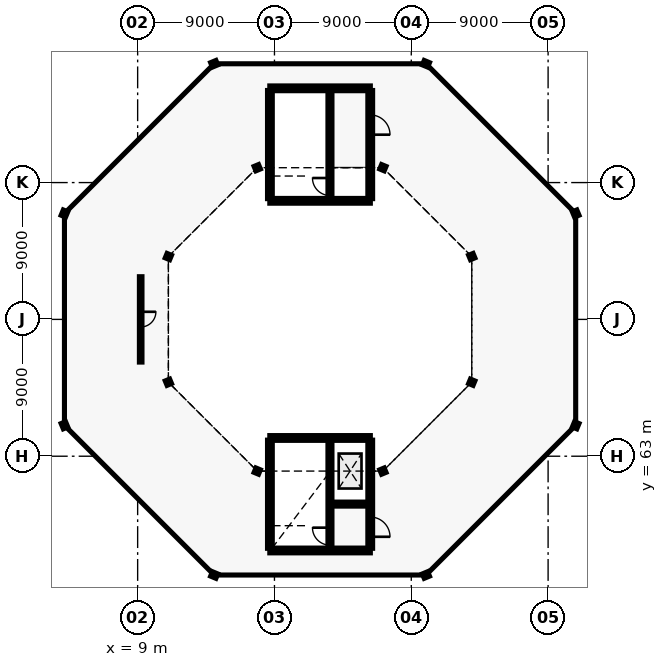
"""IFC4 building model, lengths in metres.
Left out: names, types, materials, properties, quantities, classifications, styles, units other than length and angle.
Written with IfcOpenShell. Run it as: python <this file> out.ifc"""

import sys

from ifc_helpers import new_model, si_unit, direction, frame, frame_2d, origin, origin_2d, place, context, subcontext, project, spatial, rectangle, i_section, extrude, element, fill, save


model = new_model("IFC4")
c1 = context("Model", 3, precision=1e-05, world=origin(), true_north=direction((0.0, 1.0)))
c2 = subcontext(c1, "Body", "Model", "MODEL_VIEW")
j1 = project(units=[si_unit("LENGTHUNIT", "METRE"), si_unit("PLANEANGLEUNIT", "RADIAN")], contexts=[c1])
p1 = place(None, origin())
s1 = spatial("IfcSite", under=j1, at=p1, CompositionType="ELEMENT")
p2 = place(p1, origin())
s2 = spatial("IfcBuilding", under=s1, at=p2, CompositionType="ELEMENT")
p3 = place(p2, frame((0.0, 0.0, 5.4)))
s3 = spatial("IfcBuildingStorey", under=s2, at=p3, CompositionType="ELEMENT", Elevation=5.4)
p4 = place(p3, frame((30.978, 76.133, 0.0), z_axis=(0.0, 0.0, 1.0), x_axis=(0.923879532511, 0.382683432365, 0.0)))
e1 = element("IfcColumn", 1, at=p4, inside=s3, PredefinedType="COLUMN", context=c2, shape_type="SweptSolid", body=[
    extrude(i_section(OverallWidth=0.3, OverallDepth=0.3, WebThickness=0.011, FlangeThickness=0.019, FilletRadius=0.027, at=origin_2d()), origin(), (0.0, 0.0, 1.0), 5.18),
])
p5 = place(p3, frame((37.815, 78.965, 0.0), z_axis=(0.0, 0.0, 1.0), x_axis=(0.923879532511, 0.382683432365, 0.0)))
e2 = element("IfcColumn", 2, at=p5, inside=s3, PredefinedType="COLUMN", context=c2, shape_type="SweptSolid", body=[
    extrude(i_section(OverallWidth=0.3, OverallDepth=0.36, WebThickness=0.012, FlangeThickness=0.022, FilletRadius=0.027, at=origin_2d()), origin(), (0.0, 0.0, 1.0), 5.18),
])
p6 = place(p3, frame((25.133, 81.978, 0.0), z_axis=(0.0, 0.0, 1.0), x_axis=(0.382683432365, 0.923879532511, 0.0)))
e3 = element("IfcColumn", 3, at=p6, inside=s3, PredefinedType="COLUMN", context=c2, shape_type="SweptSolid", body=[
    extrude(i_section(OverallWidth=0.3, OverallDepth=0.3, WebThickness=0.011, FlangeThickness=0.019, FilletRadius=0.027, at=origin_2d()), origin(), (0.0, 0.0, 1.0), 5.18),
])
p7 = place(p3, frame((27.965, 88.815, 0.0), z_axis=(0.0, 0.0, 1.0), x_axis=(0.382683432365, 0.923879532511, 0.0)))
e4 = element("IfcColumn", 4, at=p7, inside=s3, PredefinedType="COLUMN", context=c2, shape_type="SweptSolid", body=[
    extrude(i_section(OverallWidth=0.3, OverallDepth=0.36, WebThickness=0.012, FlangeThickness=0.022, FilletRadius=0.027, at=origin_2d()), origin(), (0.0, 0.0, 1.0), 5.18),
])
p8 = place(p3, frame((16.867, 81.978, 0.0), z_axis=(0.0, 0.0, 1.0), x_axis=(-0.382683432365, 0.923879532511, 0.0)))
e5 = element("IfcColumn", 5, at=p8, inside=s3, PredefinedType="COLUMN", context=c2, shape_type="SweptSolid", body=[
    extrude(i_section(OverallWidth=0.3, OverallDepth=0.3, WebThickness=0.011, FlangeThickness=0.019, FilletRadius=0.027, at=origin_2d()), origin(), (0.0, 0.0, 1.0), 5.18),
])
p9 = place(p3, frame((14.035, 88.815, 0.0), z_axis=(0.0, 0.0, 1.0), x_axis=(-0.382683432365, 0.923879532511, 0.0)))
e6 = element("IfcColumn", 6, at=p9, inside=s3, PredefinedType="COLUMN", context=c2, shape_type="SweptSolid", body=[
    extrude(i_section(OverallWidth=0.3, OverallDepth=0.36, WebThickness=0.012, FlangeThickness=0.022, FilletRadius=0.027, at=origin_2d()), origin(), (0.0, 0.0, 1.0), 5.18),
])
p10 = place(p3, frame((11.022, 76.133, 0.0), z_axis=(0.0, 0.0, 1.0), x_axis=(-0.923879532511, 0.382683432365, 0.0)))
e7 = element("IfcColumn", 7, at=p10, inside=s3, PredefinedType="COLUMN", context=c2, shape_type="SweptSolid", body=[
    extrude(i_section(OverallWidth=0.3, OverallDepth=0.3, WebThickness=0.011, FlangeThickness=0.019, FilletRadius=0.027, at=origin_2d()), origin(), (0.0, 0.0, 1.0), 5.18),
])
p11 = place(p3, frame((4.185, 78.965, 0.0), z_axis=(0.0, 0.0, 1.0), x_axis=(-0.923879532511, 0.382683432365, 0.0)))
e8 = element("IfcColumn", 8, at=p11, inside=s3, PredefinedType="COLUMN", context=c2, shape_type="SweptSolid", body=[
    extrude(i_section(OverallWidth=0.3, OverallDepth=0.36, WebThickness=0.012, FlangeThickness=0.022, FilletRadius=0.027, at=origin_2d()), origin(), (0.0, 0.0, 1.0), 5.18),
])
p12 = place(p3, frame((11.022, 67.867, 0.0), z_axis=(0.0, 0.0, 1.0), x_axis=(-0.923879532511, -0.382683432365, 0.0)))
e9 = element("IfcColumn", 9, at=p12, inside=s3, PredefinedType="COLUMN", context=c2, shape_type="SweptSolid", body=[
    extrude(i_section(OverallWidth=0.3, OverallDepth=0.3, WebThickness=0.011, FlangeThickness=0.019, FilletRadius=0.027, at=origin_2d()), origin(), (0.0, 0.0, 1.0), 5.18),
])
p13 = place(p3, frame((4.185, 65.035, 0.0), z_axis=(0.0, 0.0, 1.0), x_axis=(-0.923879532511, -0.382683432365, 0.0)))
e10 = element("IfcColumn", 10, at=p13, inside=s3, PredefinedType="COLUMN", context=c2, shape_type="SweptSolid", body=[
    extrude(i_section(OverallWidth=0.3, OverallDepth=0.36, WebThickness=0.012, FlangeThickness=0.022, FilletRadius=0.027, at=origin_2d()), origin(), (0.0, 0.0, 1.0), 5.18),
])
p14 = place(p3, frame((16.867, 62.022, 0.0), z_axis=(0.0, 0.0, 1.0), x_axis=(-0.382683432365, -0.923879532511, 0.0)))
e11 = element("IfcColumn", 11, at=p14, inside=s3, PredefinedType="COLUMN", context=c2, shape_type="SweptSolid", body=[
    extrude(i_section(OverallWidth=0.3, OverallDepth=0.3, WebThickness=0.011, FlangeThickness=0.019, FilletRadius=0.027, at=origin_2d()), origin(), (0.0, 0.0, 1.0), 5.18),
])
p15 = place(p3, frame((14.035, 55.185, 0.0), z_axis=(0.0, 0.0, 1.0), x_axis=(-0.382683432365, -0.923879532511, 0.0)))
e12 = element("IfcColumn", 12, at=p15, inside=s3, PredefinedType="COLUMN", context=c2, shape_type="SweptSolid", body=[
    extrude(i_section(OverallWidth=0.3, OverallDepth=0.36, WebThickness=0.012, FlangeThickness=0.022, FilletRadius=0.027, at=origin_2d()), origin(), (0.0, 0.0, 1.0), 5.18),
])
p16 = place(p3, frame((25.133, 62.022, 0.0), z_axis=(0.0, 0.0, 1.0), x_axis=(0.382683432365, -0.923879532511, 0.0)))
e13 = element("IfcColumn", 13, at=p16, inside=s3, PredefinedType="COLUMN", context=c2, shape_type="SweptSolid", body=[
    extrude(i_section(OverallWidth=0.3, OverallDepth=0.3, WebThickness=0.011, FlangeThickness=0.019, FilletRadius=0.027, at=origin_2d()), origin(), (0.0, 0.0, 1.0), 5.18),
])
p17 = place(p3, frame((27.965, 55.185, 0.0), z_axis=(0.0, 0.0, 1.0), x_axis=(0.382683432365, -0.923879532511, 0.0)))
e14 = element("IfcColumn", 14, at=p17, inside=s3, PredefinedType="COLUMN", context=c2, shape_type="SweptSolid", body=[
    extrude(i_section(OverallWidth=0.3, OverallDepth=0.36, WebThickness=0.012, FlangeThickness=0.022, FilletRadius=0.027, at=origin_2d()), origin(), (0.0, 0.0, 1.0), 5.18),
])
p18 = place(p3, frame((30.978, 67.867, 0.0), z_axis=(0.0, 0.0, 1.0), x_axis=(0.923879532511, -0.382683432365, 0.0)))
e15 = element("IfcColumn", 15, at=p18, inside=s3, PredefinedType="COLUMN", context=c2, shape_type="SweptSolid", body=[
    extrude(i_section(OverallWidth=0.3, OverallDepth=0.3, WebThickness=0.011, FlangeThickness=0.019, FilletRadius=0.027, at=origin_2d()), origin(), (0.0, 0.0, 1.0), 5.18),
])
p19 = place(p3, frame((37.815, 65.035, 0.0), z_axis=(0.0, 0.0, 1.0), x_axis=(0.923879532511, -0.382683432365, 0.0)))
e16 = element("IfcColumn", 16, at=p19, inside=s3, PredefinedType="COLUMN", context=c2, shape_type="SweptSolid", body=[
    extrude(i_section(OverallWidth=0.3, OverallDepth=0.36, WebThickness=0.012, FlangeThickness=0.022, FilletRadius=0.027, at=origin_2d()), origin(), (0.0, 0.0, 1.0), 5.18),
])
for number, where, z_axis, x_axis in (
    (17, (17.7, 56.8, 0.0), (0.0, 0.0, 1.0), (1.0, 0.0, 0.0)),
    (18, (17.7, 64.2, 0.0), (0.0, 0.0, 1.0), (1.0, 0.0, 0.0)),
):
    element("IfcWall", number, at=place(p3, frame(where, z_axis=z_axis, x_axis=x_axis)), inside=s3, PredefinedType="SHEAR", context=c2, shape_type="SweptSolid", body=[
        extrude(rectangle(XDim=6.6, YDim=0.3, at=frame_2d((3.3, 0.0))), origin(), (0.0, 0.0, 1.0), 4.0),
    ])
p20 = place(p3, frame((17.7, 56.95, 0.0), z_axis=(0.0, 0.0, 1.0), x_axis=(0.0, 1.0, 0.0)))
e19 = element("IfcWall", 19, at=p20, inside=s3, PredefinedType="SHEAR", context=c2, shape_type="SweptSolid", body=[
    extrude(rectangle(XDim=7.1, YDim=0.3, at=frame_2d((3.55, 0.0))), origin(), (0.0, 0.0, 1.0), 4.0),
])
p21 = place(p3, frame((24.3, 56.95, 0.0), z_axis=(0.0, 0.0, 1.0), x_axis=(0.0, 1.0, 0.0)))
e20 = element("IfcWall", 20, at=p21, inside=s3, PredefinedType="SHEAR", context=c2, shape_type="SweptSolid", body=[
    extrude(rectangle(XDim=7.1, YDim=0.3, at=frame_2d((3.55, 0.0))), origin(), (0.0, 0.0, 1.0), 4.0),
])
p22 = place(p21, frame((0.75, 0.0, 0.0)))
e21 = element("IfcOpeningElement", 21, at=p22, cuts=e20, PredefinedType="OPENING", context=c2, shape_type="SweptSolid", body=[
    extrude(rectangle(XDim=1.3, YDim=2.15, at=frame_2d((0.65, 1.075))), frame((0.0, 0.16, 0.0), z_axis=(0.0, -1.0, 0.0), x_axis=(1.0, 0.0, 0.0)), (0.0, 0.0, 1.0), 0.32),
])
p23 = place(p3, frame((21.65, 56.95, 0.0), z_axis=(0.0, 0.0, 1.0), x_axis=(0.0, 1.0, 0.0)))
e22 = element("IfcWall", 22, at=p23, inside=s3, PredefinedType="SHEAR", context=c2, shape_type="SweptSolid", body=[
    extrude(rectangle(XDim=7.1, YDim=0.25, at=frame_2d((3.55, 0.0))), origin(), (0.0, 0.0, 1.0), 4.0),
])
p24 = place(p23, frame((0.2, 0.0, 0.0)))
e23 = element("IfcOpeningElement", 23, at=p24, cuts=e22, PredefinedType="OPENING", context=c2, shape_type="SweptSolid", body=[
    extrude(rectangle(XDim=1.15, YDim=2.15, at=frame_2d((0.575, 1.075))), frame((0.0, 0.135, 0.0), z_axis=(0.0, -1.0, 0.0), x_axis=(1.0, 0.0, 0.0)), (0.0, 0.0, 1.0), 0.27),
])
p25 = place(p3, frame((21.77, 59.85, 0.0), z_axis=(0.0, 0.0, 1.0), x_axis=(1.0, 0.0, 0.0)))
e24 = element("IfcWall", 24, at=p25, inside=s3, PredefinedType="SHEAR", context=c2, shape_type="SweptSolid", body=[
    extrude(rectangle(XDim=2.38, YDim=0.25, at=frame_2d((1.19, 0.0))), origin(), (0.0, 0.0, 1.0), 4.0),
])
p26 = place(p25, frame((0.64, 0.0, 0.0)))
e25 = element("IfcOpeningElement", 25, at=p26, cuts=e24, PredefinedType="OPENING", context=c2, shape_type="SweptSolid", body=[
    extrude(rectangle(XDim=1.1, YDim=2.15, at=frame_2d((0.55, 1.075))), frame((0.0, 0.135, 0.0), z_axis=(0.0, -1.0, 0.0), x_axis=(1.0, 0.0, 0.0)), (0.0, 0.0, 1.0), 0.27),
])
for number, where, z_axis, x_axis in (
    (26, (17.7, 79.8, 0.0), (0.0, 0.0, 1.0), (1.0, 0.0, 0.0)),
    (27, (17.7, 87.2, 0.0), (0.0, 0.0, 1.0), (1.0, 0.0, 0.0)),
):
    element("IfcWall", number, at=place(p3, frame(where, z_axis=z_axis, x_axis=x_axis)), inside=s3, PredefinedType="SHEAR", context=c2, shape_type="SweptSolid", body=[
        extrude(rectangle(XDim=6.6, YDim=0.3, at=frame_2d((3.3, 0.0))), origin(), (0.0, 0.0, 1.0), 4.0),
    ])
p27 = place(p3, frame((17.7, 79.95, 0.0), z_axis=(0.0, 0.0, 1.0), x_axis=(0.0, 1.0, 0.0)))
e28 = element("IfcWall", 28, at=p27, inside=s3, PredefinedType="SHEAR", context=c2, shape_type="SweptSolid", body=[
    extrude(rectangle(XDim=7.1, YDim=0.3, at=frame_2d((3.55, 0.0))), origin(), (0.0, 0.0, 1.0), 4.0),
])
p28 = place(p3, frame((24.3, 79.95, 0.0), z_axis=(0.0, 0.0, 1.0), x_axis=(0.0, 1.0, 0.0)))
e29 = element("IfcWall", 29, at=p28, inside=s3, PredefinedType="SHEAR", context=c2, shape_type="SweptSolid", body=[
    extrude(rectangle(XDim=7.1, YDim=0.3, at=frame_2d((3.55, 0.0))), origin(), (0.0, 0.0, 1.0), 4.0),
])
p29 = place(p28, frame((4.2, 0.0, 0.0)))
e30 = element("IfcOpeningElement", 30, at=p29, cuts=e29, PredefinedType="OPENING", context=c2, shape_type="SweptSolid", body=[
    extrude(rectangle(XDim=1.3, YDim=2.15, at=frame_2d((0.65, 1.075))), frame((0.0, 0.16, 0.0), z_axis=(0.0, -1.0, 0.0), x_axis=(1.0, 0.0, 0.0)), (0.0, 0.0, 1.0), 0.32),
])
p30 = place(p3, frame((21.65, 79.95, 0.0), z_axis=(0.0, 0.0, 1.0), x_axis=(0.0, 1.0, 0.0)))
e31 = element("IfcWall", 31, at=p30, inside=s3, PredefinedType="SHEAR", context=c2, shape_type="SweptSolid", body=[
    extrude(rectangle(XDim=7.1, YDim=0.25, at=frame_2d((3.55, 0.0))), origin(), (0.0, 0.0, 1.0), 4.0),
])
p31 = place(p30, frame((0.2, 0.0, 0.0)))
e32 = element("IfcOpeningElement", 32, at=p31, cuts=e31, PredefinedType="OPENING", context=c2, shape_type="SweptSolid", body=[
    extrude(rectangle(XDim=1.15, YDim=2.15, at=frame_2d((0.575, 1.075))), frame((0.0, 0.135, 0.0), z_axis=(0.0, -1.0, 0.0), x_axis=(1.0, 0.0, 0.0)), (0.0, 0.0, 1.0), 0.27),
])
p32 = place(p3, frame((9.2, 69.2, 0.0), z_axis=(0.0, 0.0, 1.0), x_axis=(0.0, 1.0, 0.0)))
e33 = element("IfcWall", 33, at=p32, inside=s3, PredefinedType="PARTITIONING", context=c2, shape_type="SweptSolid", body=[
    extrude(rectangle(XDim=5.6, YDim=0.155, at=frame_2d((2.8, 0.0))), origin(), (0.0, 0.0, 1.0), 3.2),
])
p33 = place(p32, frame((2.3, 0.0, 0.0)))
e34 = element("IfcOpeningElement", 34, at=p33, cuts=e33, PredefinedType="OPENING", context=c2, shape_type="SweptSolid", body=[
    extrude(rectangle(XDim=1.0, YDim=2.1, at=frame_2d((0.5, 1.05))), frame((0.0, 0.087, 0.0), z_axis=(0.0, -1.0, 0.0), x_axis=(1.0, 0.0, 0.0)), (0.0, 0.0, 1.0), 0.175),
])
p34 = place(p22, frame((1.3, 0.0, 0.0), z_axis=(0.0, 0.0, 1.0), x_axis=(-1.0, 0.0, 0.0)))
e35 = element("IfcDoor", 35, at=p34, inside=s3, OperationType="DOUBLE_DOOR_SINGLE_SWING", PredefinedType="DOOR", context=c2, shape_type="SweptSolid", body=[
    extrude(rectangle(XDim=1.3, YDim=2.15, at=frame_2d((0.65, 1.075))), frame((0.0, 0.025, 0.0), z_axis=(0.0, -1.0, 0.0), x_axis=(1.0, 0.0, 0.0)), (0.0, 0.0, 1.0), 0.05),
])
fill(e21, e35)
p35 = place(p24, frame((1.15, 0.0, 0.0), z_axis=(0.0, 0.0, 1.0), x_axis=(-1.0, 0.0, 0.0)))
e36 = element("IfcDoor", 36, at=p35, inside=s3, OperationType="SINGLE_SWING_RIGHT", PredefinedType="DOOR", context=c2, shape_type="SweptSolid", body=[
    extrude(rectangle(XDim=1.15, YDim=2.15, at=frame_2d((0.575, 1.075))), frame((0.0, 0.025, 0.0), z_axis=(0.0, -1.0, 0.0), x_axis=(1.0, 0.0, 0.0)), (0.0, 0.0, 1.0), 0.05),
])
fill(e23, e36)
p36 = place(p26, origin())
e37 = element("IfcDoor", 37, at=p36, inside=s3, OperationType="SLIDING_TO_LEFT", PredefinedType="DOOR", context=c2, shape_type="SweptSolid", body=[
    extrude(rectangle(XDim=1.1, YDim=2.15, at=frame_2d((0.55, 1.075))), frame((0.0, 0.025, 0.0), z_axis=(0.0, -1.0, 0.0), x_axis=(1.0, 0.0, 0.0)), (0.0, 0.0, 1.0), 0.05),
])
fill(e25, e37)
p37 = place(p29, frame((1.3, 0.0, 0.0), z_axis=(0.0, 0.0, 1.0), x_axis=(-1.0, 0.0, 0.0)))
e38 = element("IfcDoor", 38, at=p37, inside=s3, OperationType="DOUBLE_DOOR_SINGLE_SWING", PredefinedType="DOOR", context=c2, shape_type="SweptSolid", body=[
    extrude(rectangle(XDim=1.3, YDim=2.15, at=frame_2d((0.65, 1.075))), frame((0.0, 0.025, 0.0), z_axis=(0.0, -1.0, 0.0), x_axis=(1.0, 0.0, 0.0)), (0.0, 0.0, 1.0), 0.05),
])
fill(e30, e38)
p38 = place(p31, frame((1.15, 0.0, 0.0), z_axis=(0.0, 0.0, 1.0), x_axis=(-1.0, 0.0, 0.0)))
e39 = element("IfcDoor", 39, at=p38, inside=s3, OperationType="SINGLE_SWING_RIGHT", PredefinedType="DOOR", context=c2, shape_type="SweptSolid", body=[
    extrude(rectangle(XDim=1.15, YDim=2.15, at=frame_2d((0.575, 1.075))), frame((0.0, 0.025, 0.0), z_axis=(0.0, -1.0, 0.0), x_axis=(1.0, 0.0, 0.0)), (0.0, 0.0, 1.0), 0.05),
])
fill(e32, e39)
p39 = place(p33, origin())
e40 = element("IfcDoor", 40, at=p39, inside=s3, OperationType="SINGLE_SWING_RIGHT", PredefinedType="DOOR", context=c2, shape_type="SweptSolid", body=[
    extrude(rectangle(XDim=1.0, YDim=2.1, at=frame_2d((0.5, 1.05))), frame((0.0, 0.025, 0.0), z_axis=(0.0, -1.0, 0.0), x_axis=(1.0, 0.0, 0.0)), (0.0, 0.0, 1.0), 0.05),
])
fill(e34, e40)
save(model, sys.argv[1])
